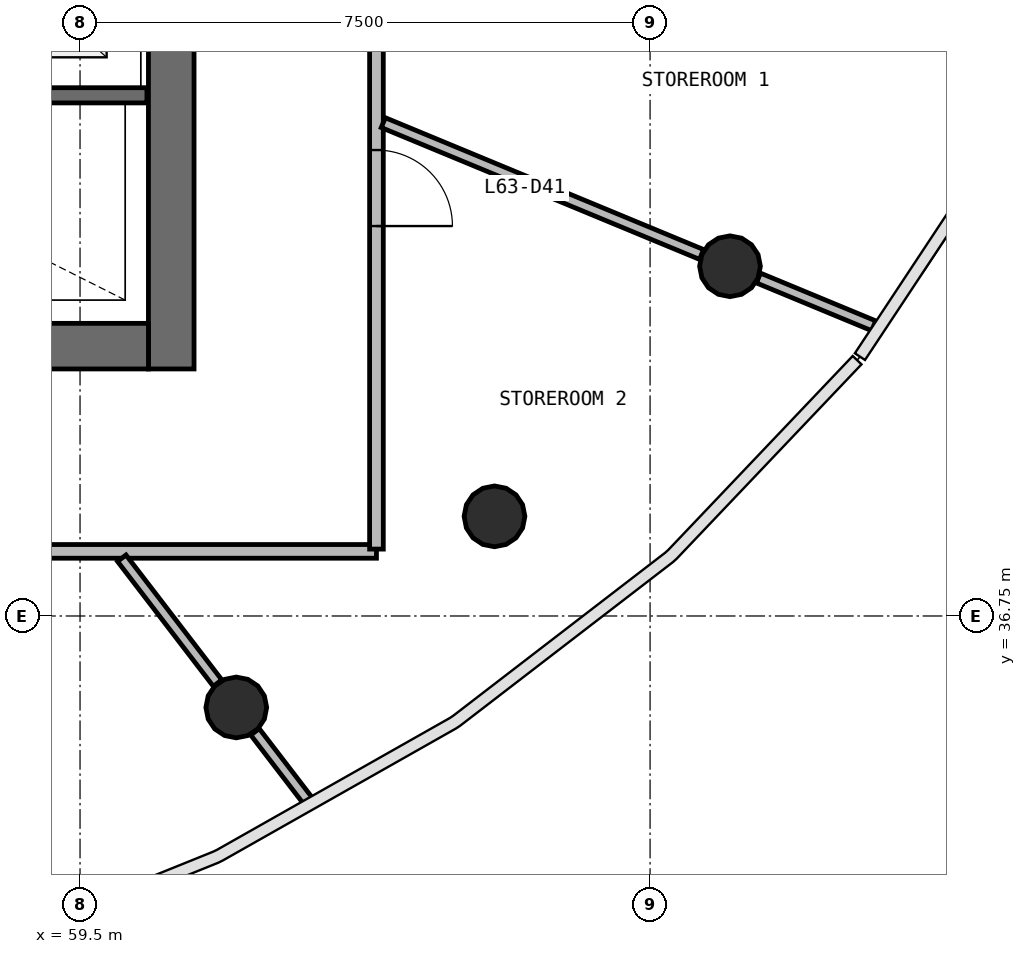
"""IFC4 building model, lengths in metres.
Left out: names, types, materials, properties, quantities, classifications, styles, units other than length and angle.
Written with IfcOpenShell. Run it as: python <this file> out.ifc"""

import sys

from ifc_helpers import new_model, si_unit, direction, frame, frame_2d, origin, origin_2d, place, context, subcontext, project, spatial, rectangle, circle, extrude, source, transform, mapped, element, fill, save


model = new_model("IFC4")
c1 = context("Model", 3, precision=1e-05, world=origin(), true_north=direction((0.0, 1.0)))
c2 = subcontext(c1, "Body", "Model", "MODEL_VIEW")
j1 = project(units=[si_unit("LENGTHUNIT", "METRE"), si_unit("PLANEANGLEUNIT", "RADIAN")], contexts=[c1])
p1 = place(None, origin())
s1 = spatial("IfcSite", under=j1, at=p1, CompositionType="ELEMENT")
p2 = place(p1, origin())
s2 = spatial("IfcBuilding", under=s1, at=p2, CompositionType="ELEMENT")
p3 = place(p2, frame((0.0, 0.0, 257.9)))
s3 = spatial("IfcBuildingStorey", under=s2, at=p3, CompositionType="ELEMENT", Elevation=257.9)
p4 = place(p3, frame((60.7, 40.0, 0.0), z_axis=(0.0, 0.0, 1.0), x_axis=(0.0, 1.0, 0.0)))
e1 = element("IfcWall", 1, at=p4, inside=s3, PredefinedType="SHEAR", context=c2, shape_type="SweptSolid", body=[
    extrude(rectangle(XDim=16.0, YDim=0.6, at=frame_2d((8.0, 0.0))), origin(), (0.0, 0.0, 1.0), 3.9),
])
p5 = place(p4, frame((7.1, 0.0, 0.0)))
e2 = element("IfcOpeningElement", 2, at=p5, cuts=e1, PredefinedType="OPENING", context=c2, shape_type="SweptSolid", body=[
    extrude(rectangle(XDim=1.8, YDim=2.1, at=frame_2d((0.9, 1.05))), frame((0.0, 0.31, 0.0), z_axis=(0.0, -1.0, 0.0), x_axis=(1.0, 0.0, 0.0)), (0.0, 0.0, 1.0), 0.62),
])
p6 = place(p3, frame((43.6, 40.3, 0.0), z_axis=(0.0, 0.0, 1.0), x_axis=(1.0, 0.0, 0.0)))
e3 = element("IfcWall", 3, at=p6, inside=s3, PredefinedType="SHEAR", context=c2, shape_type="SweptSolid", body=[
    extrude(rectangle(XDim=16.8, YDim=0.6, at=frame_2d((8.4, 0.0))), origin(), (0.0, 0.0, 1.0), 3.9),
])
p7 = place(p6, frame((10.3, 0.0, 0.0)))
e4 = element("IfcOpeningElement", 4, at=p7, cuts=e3, PredefinedType="OPENING", context=c2, shape_type="SweptSolid", body=[
    extrude(rectangle(XDim=1.2, YDim=2.1, at=frame_2d((0.6, 1.05))), frame((0.0, 0.31, 0.0), z_axis=(0.0, -1.0, 0.0), x_axis=(1.0, 0.0, 0.0)), (0.0, 0.0, 1.0), 0.62),
])
p8 = place(p6, frame((7.25, 0.0, 0.0)))
e5 = element("IfcOpeningElement", 5, at=p8, cuts=e3, PredefinedType="OPENING", context=c2, shape_type="SweptSolid", body=[
    extrude(rectangle(XDim=1.1, YDim=2.1, at=frame_2d((0.55, 1.05))), frame((0.0, 0.31, 0.0), z_axis=(0.0, -1.0, 0.0), x_axis=(1.0, 0.0, 0.0)), (0.0, 0.0, 1.0), 0.62),
])
p9 = place(p6, frame((0.7, 0.0, 0.0)))
e6 = element("IfcOpeningElement", 6, at=p9, cuts=e3, PredefinedType="OPENING", context=c2, shape_type="SweptSolid", body=[
    extrude(rectangle(XDim=0.8, YDim=2.1, at=frame_2d((0.4, 1.05))), frame((0.0, 0.31, 0.0), z_axis=(0.0, -1.0, 0.0), x_axis=(1.0, 0.0, 0.0)), (0.0, 0.0, 1.0), 0.62),
])
m1 = source(origin(), c2, "Body", "SweptSolid", [
    extrude(circle(Radius=0.4, at=origin_2d()), origin(), (0.0, 0.0, 1.0), 3.9),
])
for number, where, z_axis, x_axis in (
    (7, (61.556, 35.547, 0.0), (0.0, 0.0, 1.0), (1.0, 0.0, 0.0)),
    (8, (64.953, 38.061, 0.0), (0.0, 0.0, 1.0), (1.0, 0.0, 0.0)),
    (9, (68.052, 41.351, 0.0), (0.0, 0.0, 1.0), (1.0, 0.0, 0.0)),
):
    element("IfcColumn", number, at=place(p3, frame(where, z_axis=z_axis, x_axis=x_axis)), inside=s3, PredefinedType="COLUMN", context=c2, shape_type="MappedRepresentation", body=[
        mapped(m1, transform((0.0, 0.0, 0.0), scale=1.0)),
    ])
p10 = place(p3, frame((57.7, 43.6, 0.0), z_axis=(0.0, 0.0, 1.0), x_axis=(1.0, 0.0, 0.0)))
e10 = element("IfcWall", 10, at=p10, inside=s3, PredefinedType="SOLIDWALL", context=c2, shape_type="SweptSolid", body=[
    extrude(rectangle(XDim=2.68, YDim=0.2, at=frame_2d((1.34, 0.0))), origin(), (0.0, 0.0, 1.0), 3.58),
])
p11 = place(p3, frame((63.4, 37.6, 0.0), z_axis=(0.0, 0.0, 1.0), x_axis=(-1.0, 0.0, 0.0)))
e11 = element("IfcWall", 11, at=p11, inside=s3, PredefinedType="PARTITIONING", context=c2, shape_type="SweptSolid", body=[
    extrude(rectangle(XDim=22.8, YDim=0.18, at=frame_2d((11.4, 0.0))), origin(), (0.0, 0.0, 1.0), 2.88),
])
p12 = place(p11, frame((12.95, 0.0, 0.0)))
e12 = element("IfcOpeningElement", 12, at=p12, cuts=e11, PredefinedType="OPENING", context=c2, shape_type="SweptSolid", body=[
    extrude(rectangle(XDim=1.0, YDim=2.1, at=frame_2d((0.5, 1.05))), frame((0.0, 0.1, 0.0), z_axis=(0.0, -1.0, 0.0), x_axis=(1.0, 0.0, 0.0)), (0.0, 0.0, 1.0), 0.2),
])
p13 = place(p11, frame((10.95, 0.0, 0.0)))
e13 = element("IfcOpeningElement", 13, at=p13, cuts=e11, PredefinedType="OPENING", context=c2, shape_type="SweptSolid", body=[
    extrude(rectangle(XDim=1.0, YDim=2.1, at=frame_2d((0.5, 1.05))), frame((0.0, 0.1, 0.0), z_axis=(0.0, -1.0, 0.0), x_axis=(1.0, 0.0, 0.0)), (0.0, 0.0, 1.0), 0.2),
])
p14 = place(p11, frame((8.75, 0.0, 0.0)))
e14 = element("IfcOpeningElement", 14, at=p14, cuts=e11, PredefinedType="OPENING", context=c2, shape_type="SweptSolid", body=[
    extrude(rectangle(XDim=1.0, YDim=2.1, at=frame_2d((0.5, 1.05))), frame((0.0, 0.1, 0.0), z_axis=(0.0, -1.0, 0.0), x_axis=(1.0, 0.0, 0.0)), (0.0, 0.0, 1.0), 0.2),
])
p15 = place(p3, frame((63.4, 58.37, 0.0), z_axis=(0.0, 0.0, 1.0), x_axis=(0.0, -1.0, 0.0)))
e15 = element("IfcWall", 15, at=p15, inside=s3, PredefinedType="PARTITIONING", context=c2, shape_type="SweptSolid", body=[
    extrude(rectangle(XDim=20.74, YDim=0.18, at=frame_2d((10.37, 0.0))), origin(), (0.0, 0.0, 1.0), 2.88),
])
p16 = place(p15, frame((9.99, 0.0, 0.0)))
e16 = element("IfcOpeningElement", 16, at=p16, cuts=e15, PredefinedType="OPENING", context=c2, shape_type="SweptSolid", body=[
    extrude(rectangle(XDim=0.9, YDim=2.1, at=frame_2d((0.45, 1.05))), frame((0.0, 0.1, 0.0), z_axis=(0.0, -1.0, 0.0), x_axis=(1.0, 0.0, 0.0)), (0.0, 0.0, 1.0), 0.2),
])
p17 = place(p15, frame((7.79, 0.0, 0.0)))
e17 = element("IfcOpeningElement", 17, at=p17, cuts=e15, PredefinedType="OPENING", context=c2, shape_type="SweptSolid", body=[
    extrude(rectangle(XDim=0.9, YDim=2.1, at=frame_2d((0.45, 1.05))), frame((0.0, 0.1, 0.0), z_axis=(0.0, -1.0, 0.0), x_axis=(1.0, 0.0, 0.0)), (0.0, 0.0, 1.0), 0.2),
])
p18 = place(p15, frame((4.29, 0.0, 0.0)))
e18 = element("IfcOpeningElement", 18, at=p18, cuts=e15, PredefinedType="OPENING", context=c2, shape_type="SweptSolid", body=[
    extrude(rectangle(XDim=1.0, YDim=2.1, at=frame_2d((0.5, 1.05))), frame((0.0, 0.1, 0.0), z_axis=(0.0, -1.0, 0.0), x_axis=(1.0, 0.0, 0.0)), (0.0, 0.0, 1.0), 0.2),
])
p19 = place(p15, frame((15.49, 0.0, 0.0)))
e19 = element("IfcOpeningElement", 19, at=p19, cuts=e15, PredefinedType="OPENING", context=c2, shape_type="SweptSolid", body=[
    extrude(rectangle(XDim=1.0, YDim=2.1, at=frame_2d((0.5, 1.05))), frame((0.0, 0.1, 0.0), z_axis=(0.0, -1.0, 0.0), x_axis=(1.0, 0.0, 0.0)), (0.0, 0.0, 1.0), 0.2),
])
p20 = place(p15, frame((12.09, 0.0, 0.0)))
e20 = element("IfcOpeningElement", 20, at=p20, cuts=e15, PredefinedType="OPENING", context=c2, shape_type="SweptSolid", body=[
    extrude(rectangle(XDim=1.0, YDim=2.1, at=frame_2d((0.5, 1.05))), frame((0.0, 0.1, 0.0), z_axis=(0.0, -1.0, 0.0), x_axis=(1.0, 0.0, 0.0)), (0.0, 0.0, 1.0), 0.2),
])
p21 = place(p3, frame((63.49, 43.241, 0.0), z_axis=(0.0, 0.0, 1.0), x_axis=(0.923863854318, -0.382721280679, 0.0)))
e21 = element("IfcWall", 21, at=p21, inside=s3, PredefinedType="PARTITIONING", context=c2, shape_type="SweptSolid", body=[
    extrude(rectangle(XDim=4.532, YDim=0.14, at=frame_2d((2.266, 0.0))), origin(), (0.0, 0.0, 1.0), 2.88),
])
p22 = place(p3, frame((60.049, 37.51, 0.0), z_axis=(0.0, 0.0, 1.0), x_axis=(0.608701397958, -0.793399400128, 0.0)))
e22 = element("IfcWall", 22, at=p22, inside=s3, PredefinedType="PARTITIONING", context=c2, shape_type="SweptSolid", body=[
    extrude(rectangle(XDim=2.07, YDim=0.14, at=frame_2d((1.035, 0.0))), origin(), (0.0, 0.0, 1.0), 2.88),
])
p23 = place(p3, frame((68.426, 41.196, 0.0), z_axis=(0.0, 0.0, 1.0), x_axis=(0.923884509339, -0.38267141702, 0.0)))
e23 = element("IfcWall", 23, at=p23, inside=s3, PredefinedType="PARTITIONING", context=c2, shape_type="SweptSolid", body=[
    extrude(rectangle(XDim=1.642, YDim=0.14, at=frame_2d((0.821, 0.0))), origin(), (0.0, 0.0, 1.0), 2.88),
])
p24 = place(p3, frame((61.802, 35.226, 0.0), z_axis=(0.0, 0.0, 1.0), x_axis=(0.608781268648, -0.793338116406, 0.0)))
e24 = element("IfcWall", 24, at=p24, inside=s3, PredefinedType="PARTITIONING", context=c2, shape_type="SweptSolid", body=[
    extrude(rectangle(XDim=1.143, YDim=0.14, at=frame_2d((0.571, 0.0))), origin(), (0.0, 0.0, 1.0), 2.88),
])
m2 = source(origin(), c2, "Body", "SweptSolid", [
    extrude(rectangle(XDim=1.0, YDim=2.1, at=frame_2d((0.5, 1.05))), frame((0.0, 0.025, 0.0), z_axis=(0.0, -1.0, 0.0), x_axis=(1.0, 0.0, 0.0)), (0.0, 0.0, 1.0), 0.05),
])
p25 = place(p19, origin())
e25 = element("IfcDoor", 25, at=p25, inside=s3, OperationType="SINGLE_SWING_RIGHT", PredefinedType="DOOR", context=c2, shape_type="MappedRepresentation", body=[
    mapped(m2, transform((0.0, 0.0, 0.0), scale=1.0)),
])
fill(e19, e25)
save(model, sys.argv[1])
